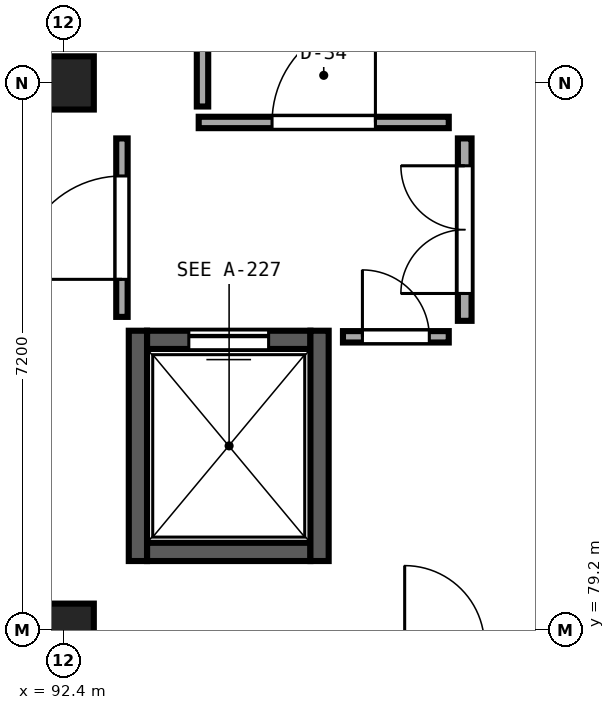
"""IFC4 building model, lengths in metres.
Left out: names, types, materials, properties, quantities, classifications, styles, units other than length and angle.
Written with IfcOpenShell. Run it as: python <this file> out.ifc"""

import sys

from ifc_helpers import new_model, si_unit, direction, frame, frame_2d, origin, origin_2d, place, context, subcontext, project, spatial, rectangle, extrude, element, fill, save


model = new_model("IFC4")
c1 = context("Model", 3, precision=1e-05, world=origin(), true_north=direction((0.0, 1.0)))
c2 = subcontext(c1, "Body", "Model", "MODEL_VIEW")
j1 = project(units=[si_unit("LENGTHUNIT", "METRE"), si_unit("PLANEANGLEUNIT", "RADIAN")], contexts=[c1])
p1 = place(None, origin())
s1 = spatial("IfcSite", under=j1, at=p1, CompositionType="ELEMENT")
p2 = place(p1, origin())
s2 = spatial("IfcBuilding", under=s1, at=p2, CompositionType="ELEMENT")
p3 = place(p2, origin())
s3 = spatial("IfcBuildingStorey", under=s2, at=p3, CompositionType="ELEMENT", Elevation=0.0)
for number, where, z_axis, x_axis in (
    (1, (92.4, 79.2, 0.0), (0.0, 0.0, 1.0), (1.0, 0.0, 0.0)),
    (2, (92.4, 86.4, 0.0), (0.0, 0.0, 1.0), (1.0, 0.0, 0.0)),
):
    element("IfcColumn", number, at=place(p3, frame(where, z_axis=z_axis, x_axis=x_axis)), inside=s3, PredefinedType="COLUMN", context=c2, shape_type="SweptSolid", body=[
        extrude(rectangle(XDim=0.8, YDim=0.7, at=origin_2d()), origin(), (0.0, 0.0, 1.0), 5.4),
    ])
p4 = place(p3, frame((95.65, 83.02, 0.0), z_axis=(0.0, 0.0, 1.0), x_axis=(-1.0, 0.0, 0.0)))
e3 = element("IfcWall", 3, at=p4, inside=s3, PredefinedType="SHEAR", context=c2, shape_type="SweptSolid", body=[
    extrude(rectangle(XDim=2.15, YDim=0.24, at=frame_2d((1.075, 0.0))), origin(), (0.0, 0.0, 1.0), 6.25),
])
p5 = place(p4, frame((0.55, 0.0, 0.0)))
e4 = element("IfcOpeningElement", 4, at=p5, cuts=e3, PredefinedType="OPENING", context=c2, shape_type="SweptSolid", body=[
    extrude(rectangle(XDim=1.05, YDim=2.2, at=frame_2d((0.525, 1.1))), frame((0.0, 0.14, 0.0), z_axis=(0.0, -1.0, 0.0), x_axis=(1.0, 0.0, 0.0)), (0.0, 0.0, 1.0), 0.28),
])
p6 = place(p3, frame((93.5, 80.23, 0.0), z_axis=(0.0, 0.0, 1.0), x_axis=(1.0, 0.0, 0.0)))
e5 = element("IfcWall", 5, at=p6, inside=s3, PredefinedType="SHEAR", context=c2, shape_type="SweptSolid", body=[
    extrude(rectangle(XDim=2.15, YDim=0.24, at=frame_2d((1.075, 0.0))), origin(), (0.0, 0.0, 1.0), 6.25),
])
for number, where, z_axis, x_axis in (
    (6, (93.38, 83.14, 0.0), (0.0, 0.0, 1.0), (0.0, -1.0, 0.0)),
    (7, (95.77, 80.11, 0.0), (0.0, 0.0, 1.0), (0.0, 1.0, 0.0)),
):
    element("IfcWall", number, at=place(p3, frame(where, z_axis=z_axis, x_axis=x_axis)), inside=s3, PredefinedType="SHEAR", context=c2, shape_type="SweptSolid", body=[
        extrude(rectangle(XDim=3.03, YDim=0.24, at=frame_2d((1.515, 0.0))), origin(), (0.0, 0.0, 1.0), 6.25),
    ])
p7 = place(p3, frame((94.23, 86.09, 0.0), z_axis=(0.0, 0.0, 1.0), x_axis=(0.0, 1.0, 0.0)))
e8 = element("IfcWall", 8, at=p7, inside=s3, PredefinedType="PARTITIONING", context=c2, shape_type="SweptSolid", body=[
    extrude(rectangle(XDim=9.62, YDim=0.15, at=frame_2d((4.81, 0.0))), origin(), (0.0, 0.0, 1.0), 5.08),
])
p8 = place(p7, frame((4.37, 0.0, 0.0)))
e9 = element("IfcOpeningElement", 9, at=p8, cuts=e8, PredefinedType="OPENING", context=c2, shape_type="SweptSolid", body=[
    extrude(rectangle(XDim=0.88, YDim=2.21, at=frame_2d((0.44, 1.105))), frame((0.0, 0.095, 0.0), z_axis=(0.0, -1.0, 0.0), x_axis=(1.0, 0.0, 0.0)), (0.0, 0.0, 1.0), 0.19),
])
p9 = place(p3, frame((94.18, 85.88, 0.0), z_axis=(0.0, 0.0, 1.0), x_axis=(1.0, 0.0, 0.0)))
e10 = element("IfcWall", 10, at=p9, inside=s3, PredefinedType="PARTITIONING", context=c2, shape_type="SweptSolid", body=[
    extrude(rectangle(XDim=3.29, YDim=0.15, at=frame_2d((1.645, 0.0))), origin(), (0.0, 0.0, 1.0), 4.58),
])
p10 = place(p9, frame((0.965, 0.0, 0.0)))
e11 = element("IfcOpeningElement", 11, at=p10, cuts=e10, PredefinedType="OPENING", context=c2, shape_type="SweptSolid", body=[
    extrude(rectangle(XDim=1.36, YDim=2.45, at=frame_2d((0.68, 1.225))), frame((0.0, 0.095, 0.0), z_axis=(0.0, -1.0, 0.0), x_axis=(1.0, 0.0, 0.0)), (0.0, 0.0, 1.0), 0.19),
])
p11 = place(p3, frame((97.68, 83.27, 0.0), z_axis=(0.0, 0.0, 1.0), x_axis=(0.0, 1.0, 0.0)))
e12 = element("IfcWall", 12, at=p11, inside=s3, PredefinedType="PARTITIONING", context=c2, shape_type="SweptSolid", body=[
    extrude(rectangle(XDim=2.4, YDim=0.18, at=frame_2d((1.2, 0.0))), origin(), (0.0, 0.0, 1.0), 5.08),
])
p12 = place(p11, frame((0.36, 0.0, 0.0)))
e13 = element("IfcOpeningElement", 13, at=p12, cuts=e12, PredefinedType="OPENING", context=c2, shape_type="SweptSolid", body=[
    extrude(rectangle(XDim=1.68, YDim=2.13, at=frame_2d((0.84, 1.065))), frame((0.0, 0.11, 0.0), z_axis=(0.0, -1.0, 0.0), x_axis=(1.0, 0.0, 0.0)), (0.0, 0.0, 1.0), 0.22),
])
p13 = place(p3, frame((93.17, 83.322, 0.0), z_axis=(0.0, 0.0, 1.0), x_axis=(0.0, 1.0, 0.0)))
e14 = element("IfcWall", 14, at=p13, inside=s3, PredefinedType="PARTITIONING", context=c2, shape_type="SweptSolid", body=[
    extrude(rectangle(XDim=2.348, YDim=0.15, at=frame_2d((1.174, 0.0))), origin(), (0.0, 0.0, 1.0), 5.08),
])
p14 = place(p13, frame((0.494, 0.0, 0.0)))
e15 = element("IfcOpeningElement", 15, at=p14, cuts=e14, PredefinedType="OPENING", context=c2, shape_type="SweptSolid", body=[
    extrude(rectangle(XDim=1.36, YDim=2.21, at=frame_2d((0.68, 1.105))), frame((0.0, 0.095, 0.0), z_axis=(0.0, -1.0, 0.0), x_axis=(1.0, 0.0, 0.0)), (0.0, 0.0, 1.0), 0.19),
])
p15 = place(p3, frame((96.078, 83.06, 0.0), z_axis=(0.0, 0.0, 1.0), x_axis=(1.0, 0.0, 0.0)))
e16 = element("IfcWall", 16, at=p15, inside=s3, PredefinedType="PARTITIONING", context=c2, shape_type="SweptSolid", body=[
    extrude(rectangle(XDim=1.392, YDim=0.15, at=frame_2d((0.696, 0.0))), origin(), (0.0, 0.0, 1.0), 5.08),
])
p16 = place(p15, frame((0.256, 0.0, 0.0)))
e17 = element("IfcOpeningElement", 17, at=p16, cuts=e16, PredefinedType="OPENING", context=c2, shape_type="SweptSolid", body=[
    extrude(rectangle(XDim=0.88, YDim=2.05, at=frame_2d((0.44, 1.025))), frame((0.0, 0.095, 0.0), z_axis=(0.0, -1.0, 0.0), x_axis=(1.0, 0.0, 0.0)), (0.0, 0.0, 1.0), 0.19),
])
p17 = place(p5, origin())
e18 = element("IfcDoor", 18, at=p17, inside=s3, OperationType="SLIDING_TO_RIGHT", PredefinedType="DOOR", context=c2, shape_type="SweptSolid", body=[
    extrude(rectangle(XDim=1.05, YDim=2.2, at=frame_2d((0.525, 1.1))), frame((0.0, 0.025, 0.0), z_axis=(0.0, -1.0, 0.0), x_axis=(1.0, 0.0, 0.0)), (0.0, 0.0, 1.0), 0.05),
])
fill(e4, e18)
p18 = place(p10, origin())
e19 = element("IfcDoor", 19, at=p18, inside=s3, OperationType="SINGLE_SWING_RIGHT", PredefinedType="DOOR", context=c2, shape_type="SweptSolid", body=[
    extrude(rectangle(XDim=1.36, YDim=2.45, at=frame_2d((0.68, 1.225))), frame((0.0, 0.025, 0.0), z_axis=(0.0, -1.0, 0.0), x_axis=(1.0, 0.0, 0.0)), (0.0, 0.0, 1.0), 0.05),
])
fill(e11, e19)
p19 = place(p12, origin())
e20 = element("IfcDoor", 20, at=p19, inside=s3, OperationType="DOUBLE_DOOR_SINGLE_SWING", PredefinedType="DOOR", context=c2, shape_type="SweptSolid", body=[
    extrude(rectangle(XDim=1.68, YDim=2.13, at=frame_2d((0.84, 1.065))), frame((0.0, 0.025, 0.0), z_axis=(0.0, -1.0, 0.0), x_axis=(1.0, 0.0, 0.0)), (0.0, 0.0, 1.0), 0.05),
])
fill(e13, e20)
p20 = place(p14, origin())
e21 = element("IfcDoor", 21, at=p20, inside=s3, OperationType="SINGLE_SWING_LEFT", PredefinedType="DOOR", context=c2, shape_type="SweptSolid", body=[
    extrude(rectangle(XDim=1.36, YDim=2.21, at=frame_2d((0.68, 1.105))), frame((0.0, 0.025, 0.0), z_axis=(0.0, -1.0, 0.0), x_axis=(1.0, 0.0, 0.0)), (0.0, 0.0, 1.0), 0.05),
])
fill(e15, e21)
p21 = place(p16, origin())
e22 = element("IfcDoor", 22, at=p21, inside=s3, OperationType="SINGLE_SWING_LEFT", PredefinedType="DOOR", context=c2, shape_type="SweptSolid", body=[
    extrude(rectangle(XDim=0.88, YDim=2.05, at=frame_2d((0.44, 1.025))), frame((0.0, 0.025, 0.0), z_axis=(0.0, -1.0, 0.0), x_axis=(1.0, 0.0, 0.0)), (0.0, 0.0, 1.0), 0.05),
])
fill(e17, e22)
save(model, sys.argv[1])
